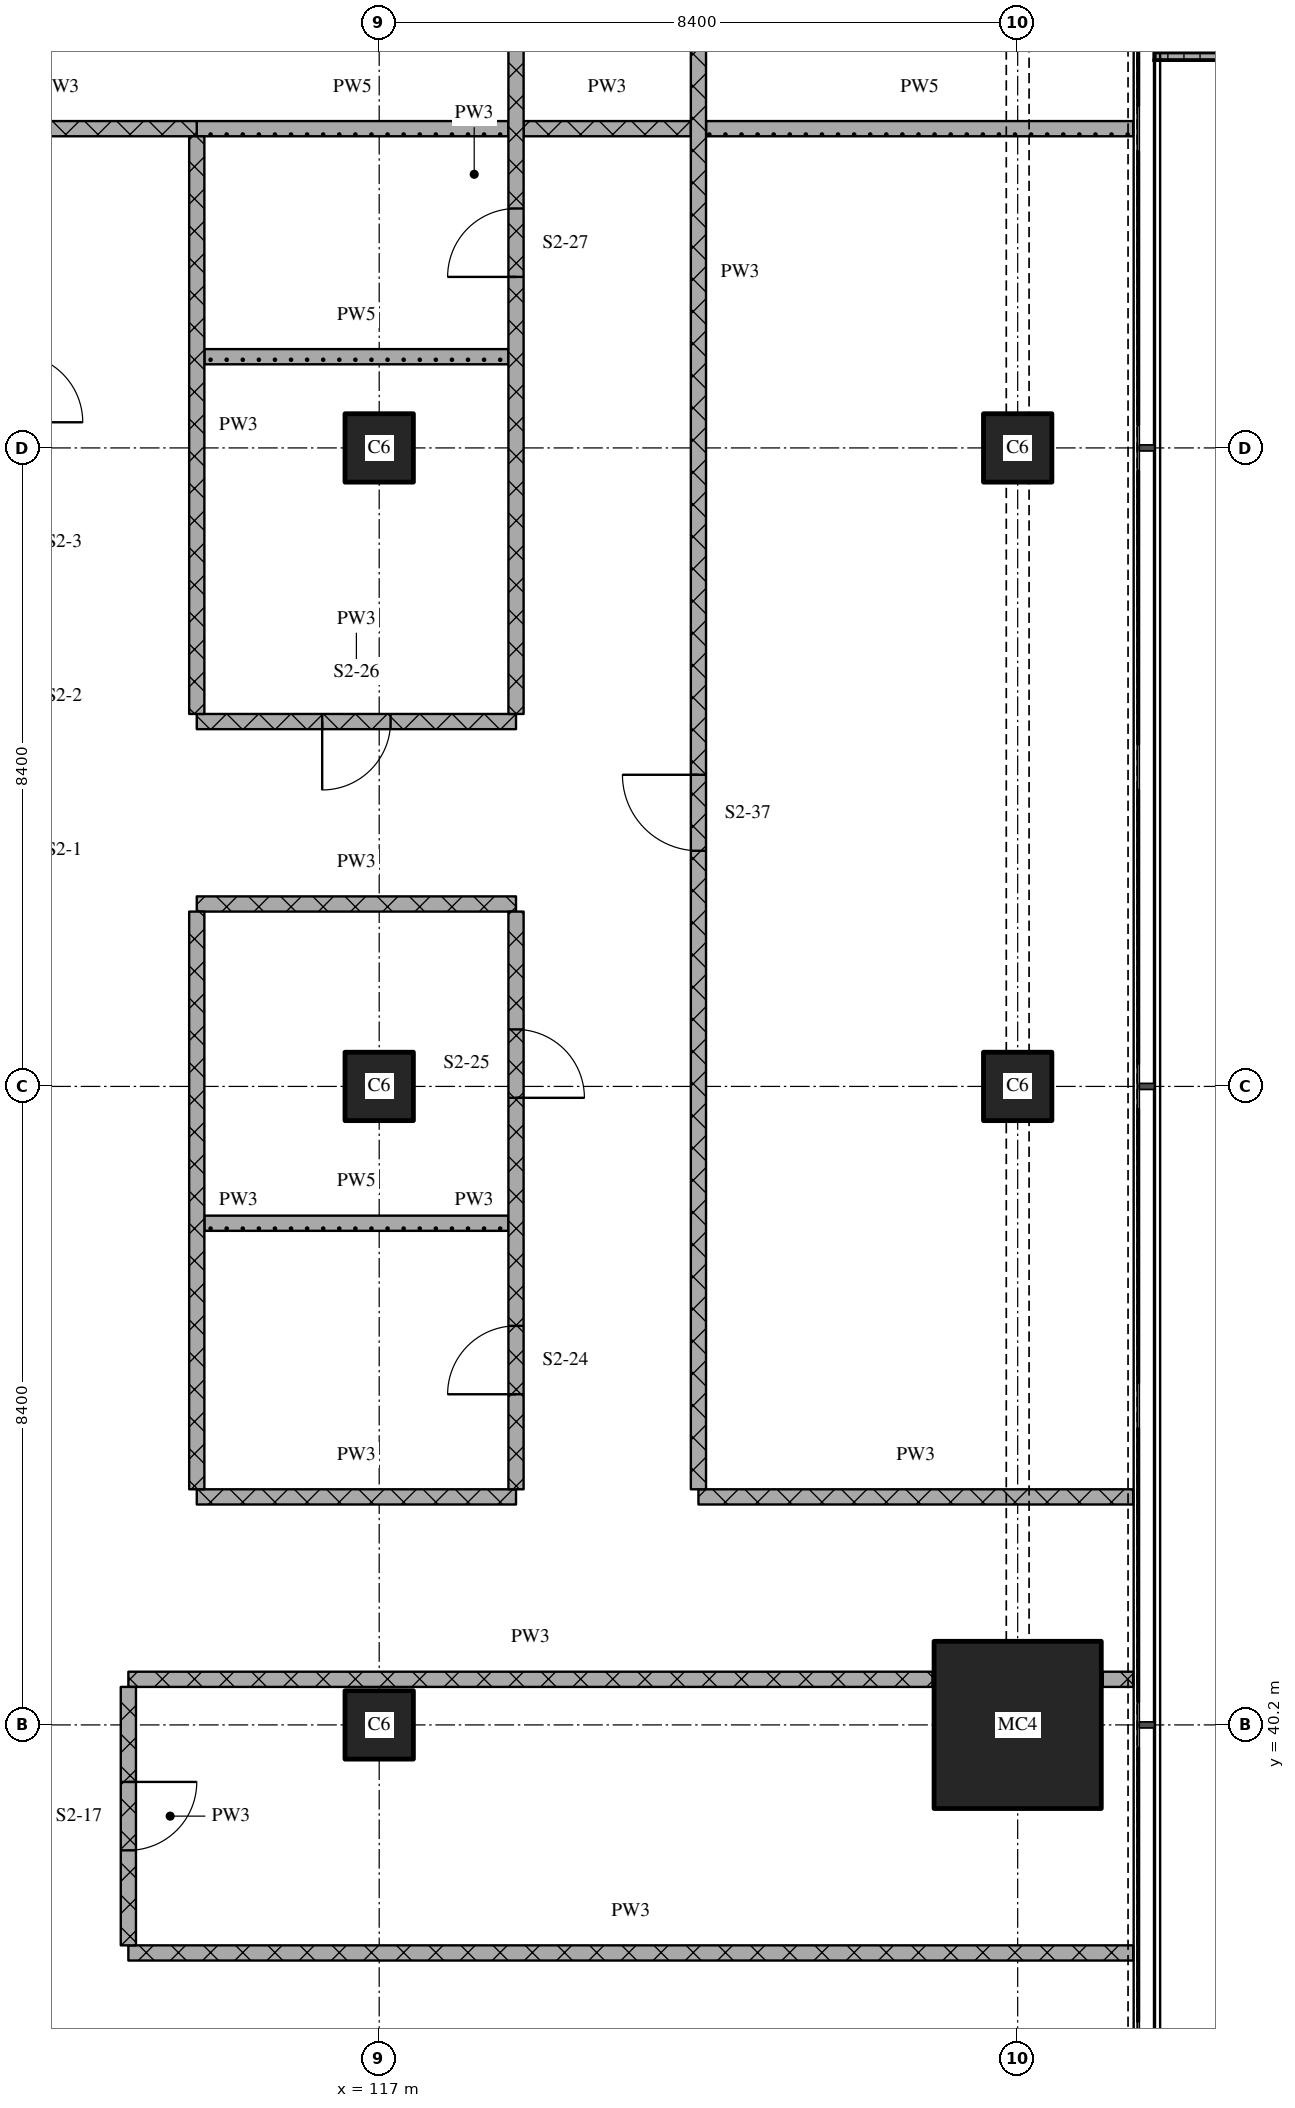
"""IFC4 building model, lengths in metres.
Left out: names, types, materials, properties, quantities, classifications, styles, units other than length and angle.
Written with IfcOpenShell. Run it as: python <this file> out.ifc"""

import sys

from ifc_helpers import new_model, si_unit, direction, frame, frame_2d, origin, origin_2d, place, context, subcontext, project, spatial, polyline, rectangle, outline, extrude, element, fill, save


model = new_model("IFC4")
c1 = context("Model", 3, precision=1e-05, world=origin(), true_north=direction((0.0, 1.0)))
c2 = subcontext(c1, "Body", "Model", "MODEL_VIEW")
j1 = project(units=[si_unit("LENGTHUNIT", "METRE"), si_unit("PLANEANGLEUNIT", "RADIAN")], contexts=[c1])
p1 = place(None, origin())
s1 = spatial("IfcSite", under=j1, at=p1, CompositionType="ELEMENT")
p2 = place(p1, origin())
s2 = spatial("IfcBuilding", under=s1, at=p2, CompositionType="ELEMENT")
p3 = place(p2, frame((0.0, 0.0, 28.2)))
s3 = spatial("IfcBuildingStorey", under=s2, at=p3, CompositionType="ELEMENT", Elevation=28.2)
for number, where, z_axis, x_axis in (
    (1, (117.0, 40.2, 0.0), (0.0, 0.0, 1.0), (1.0, 0.0, 0.0)),
    (2, (117.0, 48.6, 0.0), (0.0, 0.0, 1.0), (1.0, 0.0, 0.0)),
    (3, (117.0, 57.0, 0.0), (0.0, 0.0, 1.0), (1.0, 0.0, 0.0)),
):
    element("IfcColumn", number, at=place(p3, frame(where, z_axis=z_axis, x_axis=x_axis)), inside=s3, PredefinedType="COLUMN", context=c2, shape_type="SweptSolid", body=[
        extrude(rectangle(XDim=0.9, YDim=0.9, at=origin_2d()), origin(), (0.0, 0.0, 1.0), 4.5),
    ])
p4 = place(p3, frame((125.4, 40.2, 0.0), z_axis=(0.0, 0.0, 1.0), x_axis=(1.0, 0.0, 0.0)))
e4 = element("IfcColumn", 4, at=p4, inside=s3, PredefinedType="COLUMN", context=c2, shape_type="SweptSolid", body=[
    extrude(rectangle(XDim=2.2, YDim=2.2, at=origin_2d()), origin(), (0.0, 0.0, 1.0), 4.5),
])
for number, where, z_axis, x_axis in (
    (5, (125.4, 48.6, 0.0), (0.0, 0.0, 1.0), (1.0, 0.0, 0.0)),
    (6, (125.4, 57.0, 0.0), (0.0, 0.0, 1.0), (1.0, 0.0, 0.0)),
):
    element("IfcColumn", number, at=place(p3, frame(where, z_axis=z_axis, x_axis=x_axis)), inside=s3, PredefinedType="COLUMN", context=c2, shape_type="SweptSolid", body=[
        extrude(rectangle(XDim=0.9, YDim=0.9, at=origin_2d()), origin(), (0.0, 0.0, 1.0), 4.5),
    ])
p5 = place(p3, origin())
e7 = element("IfcWall", 7, at=p5, inside=s3, PredefinedType="SOLIDWALL", context=c2, shape_type="SweptSolid", body=[
    extrude(outline(polyline([(127.2, 62.1), (127.2, 62.2), (128.7, 62.2), (128.7, 64.4), (127.2, 64.4), (127.2, 64.5), (128.8, 64.5), (128.8, 62.1), (127.2, 62.1)])), origin(), (0.0, 0.0, 1.0), 1.0),
])
p6 = place(p3, frame((113.7, 37.2, 0.0), z_axis=(0.0, 0.0, 1.0), x_axis=(1.0, 0.0, 0.0)))
e8 = element("IfcWall", 8, at=p6, inside=s3, PredefinedType="PARTITIONING", context=c2, shape_type="SweptSolid", body=[
    extrude(rectangle(XDim=13.22, YDim=0.2, at=frame_2d((6.61, 0.0))), origin(), (0.0, 0.0, 1.0), 4.2),
])
p7 = place(p3, frame((113.7, 40.8, 0.0), z_axis=(0.0, 0.0, 1.0), x_axis=(1.0, 0.0, 0.0)))
e9 = element("IfcWall", 9, at=p7, inside=s3, PredefinedType="PARTITIONING", context=c2, shape_type="SweptSolid", body=[
    extrude(rectangle(XDim=10.58, YDim=0.2, at=frame_2d((5.29, 0.0))), origin(), (0.0, 0.0, 1.0), 4.2),
])
p8 = place(p3, frame((126.52, 40.8, 0.0), z_axis=(0.0, 0.0, 1.0), x_axis=(1.0, 0.0, 0.0)))
e10 = element("IfcWall", 10, at=p8, inside=s3, PredefinedType="PARTITIONING", context=c2, shape_type="SweptSolid", body=[
    extrude(rectangle(XDim=0.4, YDim=0.2, at=frame_2d((0.2, 0.0))), origin(), (0.0, 0.0, 1.0), 4.2),
])
p9 = place(p3, frame((114.6, 43.2, 0.0), z_axis=(0.0, 0.0, 1.0), x_axis=(1.0, 0.0, 0.0)))
e11 = element("IfcWall", 11, at=p9, inside=s3, PredefinedType="PARTITIONING", context=c2, shape_type="SweptSolid", body=[
    extrude(rectangle(XDim=4.2, YDim=0.2, at=frame_2d((2.1, 0.0))), origin(), (0.0, 0.0, 1.0), 4.2),
])
p10 = place(p3, frame((121.2, 43.2, 0.0), z_axis=(0.0, 0.0, 1.0), x_axis=(1.0, 0.0, 0.0)))
e12 = element("IfcWall", 12, at=p10, inside=s3, PredefinedType="PARTITIONING", context=c2, shape_type="SweptSolid", body=[
    extrude(rectangle(XDim=5.72, YDim=0.2, at=frame_2d((2.86, 0.0))), origin(), (0.0, 0.0, 1.0), 4.2),
])
p11 = place(p3, frame((114.7, 46.8, 0.0), z_axis=(0.0, 0.0, 1.0), x_axis=(1.0, 0.0, 0.0)))
e13 = element("IfcWall", 13, at=p11, inside=s3, PredefinedType="PARTITIONING", context=c2, shape_type="SweptSolid", body=[
    extrude(rectangle(XDim=4.0, YDim=0.2, at=frame_2d((2.0, 0.0))), origin(), (0.0, 0.0, 1.0), 4.2),
])
p12 = place(p3, frame((114.6, 51.0, 0.0), z_axis=(0.0, 0.0, 1.0), x_axis=(1.0, 0.0, 0.0)))
e14 = element("IfcWall", 14, at=p12, inside=s3, PredefinedType="PARTITIONING", context=c2, shape_type="SweptSolid", body=[
    extrude(rectangle(XDim=4.2, YDim=0.2, at=frame_2d((2.1, 0.0))), origin(), (0.0, 0.0, 1.0), 4.2),
])
p13 = place(p3, frame((114.6, 53.4, 0.0), z_axis=(0.0, 0.0, 1.0), x_axis=(1.0, 0.0, 0.0)))
e15 = element("IfcWall", 15, at=p13, inside=s3, PredefinedType="PARTITIONING", context=c2, shape_type="SweptSolid", body=[
    extrude(rectangle(XDim=4.2, YDim=0.2, at=frame_2d((2.1, 0.0))), origin(), (0.0, 0.0, 1.0), 4.2),
])
p14 = place(p13, frame((1.65, 0.0, 0.0)))
e16 = element("IfcOpeningElement", 16, at=p14, cuts=e15, PredefinedType="OPENING", context=c2, shape_type="SweptSolid", body=[
    extrude(rectangle(XDim=0.9, YDim=2.1, at=frame_2d((0.45, 1.05))), frame((0.0, 0.11, 0.0), z_axis=(0.0, -1.0, 0.0), x_axis=(1.0, 0.0, 0.0)), (0.0, 0.0, 1.0), 0.22),
])
p15 = place(p3, frame((114.7, 58.2, 0.0), z_axis=(0.0, 0.0, 1.0), x_axis=(1.0, 0.0, 0.0)))
e17 = element("IfcWall", 17, at=p15, inside=s3, PredefinedType="PARTITIONING", context=c2, shape_type="SweptSolid", body=[
    extrude(rectangle(XDim=4.0, YDim=0.2, at=frame_2d((2.0, 0.0))), origin(), (0.0, 0.0, 1.0), 4.2),
])
p16 = place(p3, frame((111.0, 61.2, 0.0), z_axis=(0.0, 0.0, 1.0), x_axis=(1.0, 0.0, 0.0)))
e18 = element("IfcWall", 18, at=p16, inside=s3, PredefinedType="PARTITIONING", context=c2, shape_type="SweptSolid", body=[
    extrude(rectangle(XDim=3.6, YDim=0.2, at=frame_2d((1.8, 0.0))), origin(), (0.0, 0.0, 1.0), 4.2),
])
p17 = place(p3, frame((118.9, 61.2, 0.0), z_axis=(0.0, 0.0, 1.0), x_axis=(1.0, 0.0, 0.0)))
e19 = element("IfcWall", 19, at=p17, inside=s3, PredefinedType="PARTITIONING", context=c2, shape_type="SweptSolid", body=[
    extrude(rectangle(XDim=2.2, YDim=0.2, at=frame_2d((1.1, 0.0))), origin(), (0.0, 0.0, 1.0), 4.2),
])
p18 = place(p3, frame((114.6, 61.2, 0.0), z_axis=(0.0, 0.0, 1.0), x_axis=(1.0, 0.0, 0.0)))
e20 = element("IfcWall", 20, at=p18, inside=s3, PredefinedType="PARTITIONING", context=c2, shape_type="SweptSolid", body=[
    extrude(rectangle(XDim=4.1, YDim=0.2, at=frame_2d((2.05, 0.0))), origin(), (0.0, 0.0, 1.0), 4.2),
])
p19 = place(p3, frame((121.3, 61.2, 0.0), z_axis=(0.0, 0.0, 1.0), x_axis=(1.0, 0.0, 0.0)))
e21 = element("IfcWall", 21, at=p19, inside=s3, PredefinedType="PARTITIONING", context=c2, shape_type="SweptSolid", body=[
    extrude(rectangle(XDim=5.62, YDim=0.2, at=frame_2d((2.81, 0.0))), origin(), (0.0, 0.0, 1.0), 4.2),
])
p20 = place(p3, frame((113.7, 40.7, 0.0), z_axis=(0.0, 0.0, 1.0), x_axis=(0.0, -1.0, 0.0)))
e22 = element("IfcWall", 22, at=p20, inside=s3, PredefinedType="PARTITIONING", context=c2, shape_type="SweptSolid", body=[
    extrude(rectangle(XDim=3.4, YDim=0.2, at=frame_2d((1.7, 0.0))), origin(), (0.0, 0.0, 1.0), 4.2),
])
p21 = place(p20, frame((1.25, 0.0, 0.0)))
e23 = element("IfcOpeningElement", 23, at=p21, cuts=e22, PredefinedType="OPENING", context=c2, shape_type="SweptSolid", body=[
    extrude(rectangle(XDim=0.9, YDim=2.1, at=frame_2d((0.45, 1.05))), frame((0.0, 0.11, 0.0), z_axis=(0.0, -1.0, 0.0), x_axis=(1.0, 0.0, 0.0)), (0.0, 0.0, 1.0), 0.22),
])
p22 = place(p3, frame((114.6, 50.9, 0.0), z_axis=(0.0, 0.0, 1.0), x_axis=(0.0, -1.0, 0.0)))
e24 = element("IfcWall", 24, at=p22, inside=s3, PredefinedType="PARTITIONING", context=c2, shape_type="SweptSolid", body=[
    extrude(rectangle(XDim=7.6, YDim=0.2, at=frame_2d((3.8, 0.0))), origin(), (0.0, 0.0, 1.0), 4.2),
])
p23 = place(p3, frame((114.6, 61.1, 0.0), z_axis=(0.0, 0.0, 1.0), x_axis=(0.0, -1.0, 0.0)))
e25 = element("IfcWall", 25, at=p23, inside=s3, PredefinedType="PARTITIONING", context=c2, shape_type="SweptSolid", body=[
    extrude(rectangle(XDim=7.6, YDim=0.2, at=frame_2d((3.8, 0.0))), origin(), (0.0, 0.0, 1.0), 4.2),
])
p24 = place(p3, frame((118.8, 43.3, 0.0), z_axis=(0.0, 0.0, 1.0), x_axis=(0.0, 1.0, 0.0)))
e26 = element("IfcWall", 26, at=p24, inside=s3, PredefinedType="PARTITIONING", context=c2, shape_type="SweptSolid", body=[
    extrude(rectangle(XDim=7.6, YDim=0.2, at=frame_2d((3.8, 0.0))), origin(), (0.0, 0.0, 1.0), 4.2),
])
p25 = place(p24, frame((1.25, 0.0, 0.0)))
e27 = element("IfcOpeningElement", 27, at=p25, cuts=e26, PredefinedType="OPENING", context=c2, shape_type="SweptSolid", body=[
    extrude(rectangle(XDim=0.9, YDim=2.1, at=frame_2d((0.45, 1.05))), frame((0.0, 0.11, 0.0), z_axis=(0.0, -1.0, 0.0), x_axis=(1.0, 0.0, 0.0)), (0.0, 0.0, 1.0), 0.22),
])
p26 = place(p24, frame((5.15, 0.0, 0.0)))
e28 = element("IfcOpeningElement", 28, at=p26, cuts=e26, PredefinedType="OPENING", context=c2, shape_type="SweptSolid", body=[
    extrude(rectangle(XDim=0.9, YDim=2.1, at=frame_2d((0.45, 1.05))), frame((0.0, 0.11, 0.0), z_axis=(0.0, -1.0, 0.0), x_axis=(1.0, 0.0, 0.0)), (0.0, 0.0, 1.0), 0.22),
])
p27 = place(p3, frame((118.8, 53.5, 0.0), z_axis=(0.0, 0.0, 1.0), x_axis=(0.0, 1.0, 0.0)))
e29 = element("IfcWall", 29, at=p27, inside=s3, PredefinedType="PARTITIONING", context=c2, shape_type="SweptSolid", body=[
    extrude(rectangle(XDim=14.2, YDim=0.2, at=frame_2d((7.1, 0.0))), origin(), (0.0, 0.0, 1.0), 4.2),
])
p28 = place(p27, frame((5.75, 0.0, 0.0)))
e30 = element("IfcOpeningElement", 30, at=p28, cuts=e29, PredefinedType="OPENING", context=c2, shape_type="SweptSolid", body=[
    extrude(rectangle(XDim=0.9, YDim=2.1, at=frame_2d((0.45, 1.05))), frame((0.0, 0.11, 0.0), z_axis=(0.0, -1.0, 0.0), x_axis=(1.0, 0.0, 0.0)), (0.0, 0.0, 1.0), 0.22),
])
p29 = place(p27, frame((10.55, 0.0, 0.0)))
e31 = element("IfcOpeningElement", 31, at=p29, cuts=e29, PredefinedType="OPENING", context=c2, shape_type="SweptSolid", body=[
    extrude(rectangle(XDim=0.9, YDim=2.1, at=frame_2d((0.45, 1.05))), frame((0.0, 0.11, 0.0), z_axis=(0.0, -1.0, 0.0), x_axis=(1.0, 0.0, 0.0)), (0.0, 0.0, 1.0), 0.22),
])
p30 = place(p3, frame((121.2, 75.32, 0.0), z_axis=(0.0, 0.0, 1.0), x_axis=(0.0, -1.0, 0.0)))
e32 = element("IfcWall", 32, at=p30, inside=s3, PredefinedType="PARTITIONING", context=c2, shape_type="SweptSolid", body=[
    extrude(rectangle(XDim=32.02, YDim=0.2, at=frame_2d((16.01, 0.0))), origin(), (0.0, 0.0, 1.0), 4.2),
])
p31 = place(p30, frame((7.729, 0.0, 0.0)))
e33 = element("IfcOpeningElement", 33, at=p31, cuts=e32, PredefinedType="OPENING", context=c2, shape_type="SweptSolid", body=[
    extrude(rectangle(XDim=1.0, YDim=2.1, at=frame_2d((0.5, 1.05))), frame((0.0, 0.11, 0.0), z_axis=(0.0, -1.0, 0.0), x_axis=(1.0, 0.0, 0.0)), (0.0, 0.0, 1.0), 0.22),
])
p32 = place(p30, frame((22.62, 0.0, 0.0)))
e34 = element("IfcOpeningElement", 34, at=p32, cuts=e32, PredefinedType="OPENING", context=c2, shape_type="SweptSolid", body=[
    extrude(rectangle(XDim=1.0, YDim=2.1, at=frame_2d((0.5, 1.05))), frame((0.0, 0.11, 0.0), z_axis=(0.0, -1.0, 0.0), x_axis=(1.0, 0.0, 0.0)), (0.0, 0.0, 1.0), 0.22),
])
p33 = place(p14, origin())
e35 = element("IfcDoor", 35, at=p33, inside=s3, OperationType="SINGLE_SWING_RIGHT", PredefinedType="DOOR", context=c2, shape_type="SweptSolid", body=[
    extrude(rectangle(XDim=0.9, YDim=2.1, at=frame_2d((0.45, 1.05))), frame((0.0, 0.025, 0.0), z_axis=(0.0, -1.0, 0.0), x_axis=(1.0, 0.0, 0.0)), (0.0, 0.0, 1.0), 0.05),
])
fill(e16, e35)
p34 = place(p21, origin())
e36 = element("IfcDoor", 36, at=p34, inside=s3, OperationType="SINGLE_SWING_LEFT", PredefinedType="DOOR", context=c2, shape_type="SweptSolid", body=[
    extrude(rectangle(XDim=0.9, YDim=2.1, at=frame_2d((0.45, 1.05))), frame((0.0, 0.025, 0.0), z_axis=(0.0, -1.0, 0.0), x_axis=(1.0, 0.0, 0.0)), (0.0, 0.0, 1.0), 0.05),
])
fill(e23, e36)
p35 = place(p25, origin())
e37 = element("IfcDoor", 37, at=p35, inside=s3, OperationType="SINGLE_SWING_LEFT", PredefinedType="DOOR", context=c2, shape_type="SweptSolid", body=[
    extrude(rectangle(XDim=0.9, YDim=2.1, at=frame_2d((0.45, 1.05))), frame((0.0, 0.025, 0.0), z_axis=(0.0, -1.0, 0.0), x_axis=(1.0, 0.0, 0.0)), (0.0, 0.0, 1.0), 0.05),
])
fill(e27, e37)
p36 = place(p26, origin())
e38 = element("IfcDoor", 38, at=p36, inside=s3, OperationType="SINGLE_SWING_RIGHT", PredefinedType="DOOR", context=c2, shape_type="SweptSolid", body=[
    extrude(rectangle(XDim=0.9, YDim=2.1, at=frame_2d((0.45, 1.05))), frame((0.0, 0.025, 0.0), z_axis=(0.0, -1.0, 0.0), x_axis=(1.0, 0.0, 0.0)), (0.0, 0.0, 1.0), 0.05),
])
fill(e28, e38)
p37 = place(p28, origin())
e39 = element("IfcDoor", 39, at=p37, inside=s3, OperationType="SINGLE_SWING_LEFT", PredefinedType="DOOR", context=c2, shape_type="SweptSolid", body=[
    extrude(rectangle(XDim=0.9, YDim=2.1, at=frame_2d((0.45, 1.05))), frame((0.0, 0.025, 0.0), z_axis=(0.0, -1.0, 0.0), x_axis=(1.0, 0.0, 0.0)), (0.0, 0.0, 1.0), 0.05),
])
fill(e30, e39)
p38 = place(p32, origin())
e40 = element("IfcDoor", 40, at=p38, inside=s3, OperationType="SINGLE_SWING_RIGHT", PredefinedType="DOOR", context=c2, shape_type="SweptSolid", body=[
    extrude(rectangle(XDim=1.0, YDim=2.1, at=frame_2d((0.5, 1.05))), frame((0.0, 0.025, 0.0), z_axis=(0.0, -1.0, 0.0), x_axis=(1.0, 0.0, 0.0)), (0.0, 0.0, 1.0), 0.05),
])
fill(e34, e40)
save(model, sys.argv[1])
